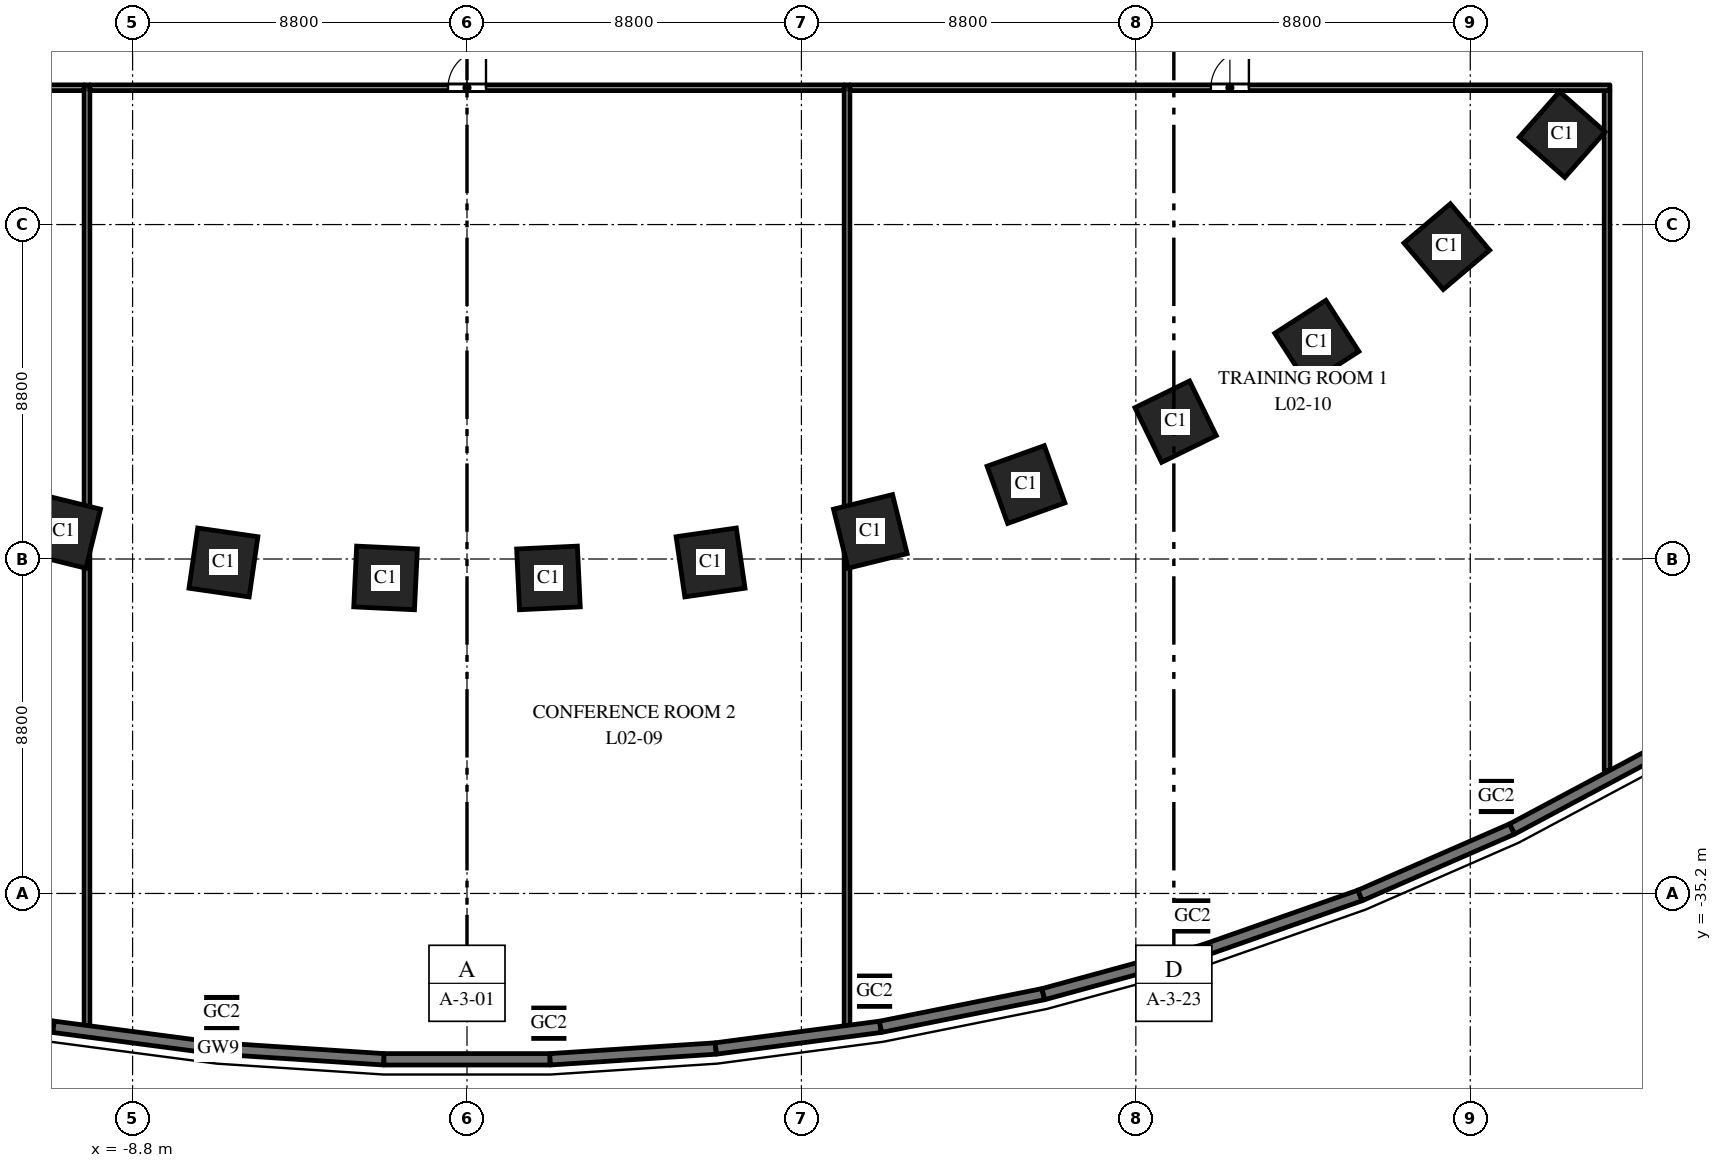
"""IFC4 building model, lengths in metres.
Left out: names, types, materials, properties, quantities, classifications, styles, units other than length and angle.
Written with IfcOpenShell. Run it as: python <this file> out.ifc"""

import sys

from ifc_helpers import new_model, si_unit, direction, frame, frame_2d, origin, origin_2d, place, context, subcontext, project, spatial, rectangle, hollow_rectangle, extrude, element, fill, save


model = new_model("IFC4")
c1 = context("Model", 3, precision=1e-05, world=origin(), true_north=direction((0.0, 1.0)))
c2 = subcontext(c1, "Body", "Model", "MODEL_VIEW")
j1 = project(units=[si_unit("LENGTHUNIT", "METRE"), si_unit("PLANEANGLEUNIT", "RADIAN")], contexts=[c1])
p1 = place(None, origin())
s1 = spatial("IfcSite", under=j1, at=p1, CompositionType="ELEMENT")
p2 = place(p1, origin())
s2 = spatial("IfcBuilding", under=s1, at=p2, CompositionType="ELEMENT")
p3 = place(p2, frame((0.0, 0.0, 13.5)))
s3 = spatial("IfcBuildingStorey", under=s2, at=p3, CompositionType="ELEMENT", Elevation=13.5)
for number, where, z_axis, x_axis in (
    (1, (-10.613, -25.674, 0.0), (0.0, 0.0, 1.0), (0.971, -0.24, 0.0)),
    (2, (-6.409, -26.491, 0.0), (0.0, 0.0, 1.0), (0.99, -0.143, 0.0)),
    (3, (-2.143, -26.898, 0.0), (0.0, 0.0, 1.0), (0.999, -0.048, 0.0)),
    (4, (2.143, -26.898, 0.0), (0.0, 0.0, 1.0), (0.999, 0.048, 0.0)),
    (5, (6.409, -26.491, 0.0), (0.0, 0.0, 1.0), (0.99, 0.143, 0.0)),
    (6, (10.613, -25.674, 0.0), (0.0, 0.0, 1.0), (0.971, 0.24, 0.0)),
    (7, (14.709, -24.441, 0.0), (0.0, 0.0, 1.0), (0.941, 0.338, 0.0)),
    (8, (18.646, -22.785, 0.0), (0.0, 0.0, 1.0), (0.898, 0.439, 0.0)),
    (9, (22.362, -20.7, 0.0), (0.0, 0.0, 1.0), (0.84, 0.542, 0.0)),
    (10, (25.783, -18.18, 0.0), (0.0, 0.0, 1.0), (0.763, 0.646, 0.0)),
    (11, (28.819, -15.23, 0.0), (0.0, 0.0, 1.0), (0.663, 0.749, 0.0)),
):
    element("IfcColumn", number, at=place(p3, frame(where, z_axis=z_axis, x_axis=x_axis)), inside=s3, PredefinedType="COLUMN", context=c2, shape_type="SweptSolid", body=[
        extrude(rectangle(XDim=1.6, YDim=1.6, at=origin_2d()), origin(), (0.0, 0.0, 1.0), 6.0),
    ])
for number, where, z_axis, x_axis in (
    (12, (-6.454, -38.333, 0.0), (0.0, 0.0, 1.0), (1.0, 0.0, 0.0)),
    (13, (2.155, -38.614, 0.0), (0.0, 0.0, 1.0), (1.0, 0.0, 0.0)),
    (14, (10.725, -37.771, 0.0), (0.0, 0.0, 1.0), (1.0, 0.0, 0.0)),
    (15, (19.097, -35.792, 0.0), (0.0, 0.0, 1.0), (1.0, 0.0, 0.0)),
    (16, (27.087, -32.648, 0.0), (0.0, 0.0, 1.0), (1.0, 0.0, 0.0)),
):
    element("IfcColumn", number, at=place(p3, frame(where, z_axis=z_axis, x_axis=x_axis)), inside=s3, PredefinedType="COLUMN", context=c2, shape_type="SweptSolid", body=[
        extrude(hollow_rectangle(XDim=0.8, YDim=0.8, WallThickness=0.04, at=origin_2d()), origin(), (0.0, 0.0, 1.0), 6.0),
    ])
p4 = place(p3, frame((-10.0, -13.925, 0.0), z_axis=(0.0, 0.0, 1.0), x_axis=(0.0, -1.0, 0.0)))
e17 = element("IfcWall", 17, at=p4, inside=s3, PredefinedType="PARTITIONING", context=c2, shape_type="SweptSolid", body=[
    extrude(rectangle(XDim=24.746, YDim=0.15, at=frame_2d((12.373, 0.0))), origin(), (0.0, 0.0, 1.0), 4.8),
])
p5 = place(p3, frame((-30.075, -14.0, 0.0), z_axis=(0.0, 0.0, 1.0), x_axis=(1.0, 0.0, 0.0)))
e18 = element("IfcWall", 18, at=p5, inside=s3, PredefinedType="PARTITIONING", context=c2, shape_type="SweptSolid", body=[
    extrude(rectangle(XDim=20.0, YDim=0.15, at=frame_2d((10.0, 0.0))), origin(), (0.0, 0.0, 1.0), 4.7),
])
p6 = place(p5, frame((9.5, 0.0, 0.0)))
e19 = element("IfcOpeningElement", 19, at=p6, cuts=e18, PredefinedType="OPENING", context=c2, shape_type="SweptSolid", body=[
    extrude(rectangle(XDim=1.0, YDim=2.1, at=frame_2d((0.5, 1.05))), frame((0.0, 0.085, 0.0), z_axis=(0.0, -1.0, 0.0), x_axis=(1.0, 0.0, 0.0)), (0.0, 0.0, 1.0), 0.17),
])
p7 = place(p3, frame((10.0, -13.925, 0.0), z_axis=(0.0, 0.0, 1.0), x_axis=(0.0, -1.0, 0.0)))
e20 = element("IfcWall", 20, at=p7, inside=s3, PredefinedType="PARTITIONING", context=c2, shape_type="SweptSolid", body=[
    extrude(rectangle(XDim=24.746, YDim=0.15, at=frame_2d((12.373, 0.0))), origin(), (0.0, 0.0, 1.0), 4.75),
])
p8 = place(p3, frame((-9.925, -14.0, 0.0), z_axis=(0.0, 0.0, 1.0), x_axis=(1.0, 0.0, 0.0)))
e21 = element("IfcWall", 21, at=p8, inside=s3, PredefinedType="PARTITIONING", context=c2, shape_type="SweptSolid", body=[
    extrude(rectangle(XDim=19.85, YDim=0.15, at=frame_2d((9.925, 0.0))), origin(), (0.0, 0.0, 1.0), 4.8),
])
p9 = place(p8, frame((9.425, 0.0, 0.0)))
e22 = element("IfcOpeningElement", 22, at=p9, cuts=e21, PredefinedType="OPENING", context=c2, shape_type="SweptSolid", body=[
    extrude(rectangle(XDim=1.0, YDim=2.1, at=frame_2d((0.5, 1.05))), frame((0.0, 0.085, 0.0), z_axis=(0.0, -1.0, 0.0), x_axis=(1.0, 0.0, 0.0)), (0.0, 0.0, 1.0), 0.17),
])
p10 = place(p3, frame((30.0, -14.075, 0.0), z_axis=(0.0, 0.0, 1.0), x_axis=(0.0, -1.0, 0.0)))
e23 = element("IfcWall", 23, at=p10, inside=s3, PredefinedType="PARTITIONING", context=c2, shape_type="SweptSolid", body=[
    extrude(rectangle(XDim=17.895, YDim=0.15, at=frame_2d((8.948, 0.0))), origin(), (0.0, 0.0, 1.0), 4.75),
])
p11 = place(p3, frame((10.075, -14.0, 0.0), z_axis=(0.0, 0.0, 1.0), x_axis=(1.0, 0.0, 0.0)))
e24 = element("IfcWall", 24, at=p11, inside=s3, PredefinedType="PARTITIONING", context=c2, shape_type="SweptSolid", body=[
    extrude(rectangle(XDim=20.0, YDim=0.15, at=frame_2d((10.0, 0.0))), origin(), (0.0, 0.0, 1.0), 4.7),
])
p12 = place(p11, frame((9.5, 0.0, 0.0)))
e25 = element("IfcOpeningElement", 25, at=p12, cuts=e24, PredefinedType="OPENING", context=c2, shape_type="SweptSolid", body=[
    extrude(rectangle(XDim=1.0, YDim=2.1, at=frame_2d((0.5, 1.05))), frame((0.0, 0.085, 0.0), z_axis=(0.0, -1.0, 0.0), x_axis=(1.0, 0.0, 0.0)), (0.0, 0.0, 1.0), 0.17),
])
p13 = place(p3, frame((-15.165, -37.85, 0.0), z_axis=(0.0, 0.0, 1.0), x_axis=(0.980494629762, -0.196545875071, 0.0)))
e26 = element("IfcWall", 26, at=p13, inside=s3, PredefinedType="SOLIDWALL", context=c2, shape_type="SweptSolid", body=[
    extrude(rectangle(XDim=4.37, YDim=0.3, at=frame_2d((2.185, 0.0))), origin(), (0.0, 0.0, 1.0), 5.75),
])
p14 = place(p13, frame((0.985, 0.0, 1.0)))
e27 = element("IfcOpeningElement", 27, at=p14, cuts=e26, PredefinedType="OPENING", context=c2, shape_type="SweptSolid", body=[
    extrude(rectangle(XDim=2.4, YDim=3.0, at=frame_2d((1.2, 1.5))), frame((0.0, 0.16, 0.0), z_axis=(0.0, -1.0, 0.0), x_axis=(1.0, 0.0, 0.0)), (0.0, 0.0, 1.0), 0.32),
])
p15 = place(p3, frame((-10.88, -38.709, 0.0), z_axis=(0.0, 0.0, 1.0), x_axis=(0.991441741932, -0.130549884544, 0.0)))
e28 = element("IfcWall", 28, at=p15, inside=s3, PredefinedType="SOLIDWALL", context=c2, shape_type="SweptSolid", body=[
    extrude(rectangle(XDim=4.37, YDim=0.3, at=frame_2d((2.185, 0.0))), origin(), (0.0, 0.0, 1.0), 5.75),
])
p16 = place(p15, frame((1.045, 0.0, 1.0)))
e29 = element("IfcOpeningElement", 29, at=p16, cuts=e28, PredefinedType="OPENING", context=c2, shape_type="SweptSolid", body=[
    extrude(rectangle(XDim=2.4, YDim=3.0, at=frame_2d((1.2, 1.5))), frame((0.0, 0.16, 0.0), z_axis=(0.0, -1.0, 0.0), x_axis=(1.0, 0.0, 0.0)), (0.0, 0.0, 1.0), 0.32),
])
p17 = place(p3, frame((-6.547, -39.28, 0.0), z_axis=(0.0, 0.0, 1.0), x_axis=(0.997876871627, -0.065128711577, 0.0)))
e30 = element("IfcWall", 30, at=p17, inside=s3, PredefinedType="SOLIDWALL", context=c2, shape_type="SweptSolid", body=[
    extrude(rectangle(XDim=4.371, YDim=0.3, at=frame_2d((2.186, 0.0))), origin(), (0.0, 0.0, 1.0), 5.75),
])
p18 = place(p17, frame((0.985, 0.0, 1.0)))
e31 = element("IfcOpeningElement", 31, at=p18, cuts=e30, PredefinedType="OPENING", context=c2, shape_type="SweptSolid", body=[
    extrude(rectangle(XDim=2.4, YDim=3.0, at=frame_2d((1.2, 1.5))), frame((0.0, 0.16, 0.0), z_axis=(0.0, -1.0, 0.0), x_axis=(1.0, 0.0, 0.0)), (0.0, 0.0, 1.0), 0.32),
])
p19 = place(p3, frame((-2.186, -39.564, 0.0), z_axis=(0.0, 0.0, 1.0), x_axis=(1.0, 0.0, 0.0)))
e32 = element("IfcWall", 32, at=p19, inside=s3, PredefinedType="SOLIDWALL", context=c2, shape_type="SweptSolid", body=[
    extrude(rectangle(XDim=4.371, YDim=0.3, at=frame_2d((2.186, 0.0))), origin(), (0.0, 0.0, 1.0), 5.75),
])
p20 = place(p19, frame((0.986, 0.0, 1.0)))
e33 = element("IfcOpeningElement", 33, at=p20, cuts=e32, PredefinedType="OPENING", context=c2, shape_type="SweptSolid", body=[
    extrude(rectangle(XDim=2.4, YDim=3.0, at=frame_2d((1.2, 1.5))), frame((0.0, 0.16, 0.0), z_axis=(0.0, -1.0, 0.0), x_axis=(1.0, 0.0, 0.0)), (0.0, 0.0, 1.0), 0.32),
])
p21 = place(p3, frame((2.186, -39.564, 0.0), z_axis=(0.0, 0.0, 1.0), x_axis=(0.997876871627, 0.065128711577, 0.0)))
e34 = element("IfcWall", 34, at=p21, inside=s3, PredefinedType="SOLIDWALL", context=c2, shape_type="SweptSolid", body=[
    extrude(rectangle(XDim=4.371, YDim=0.3, at=frame_2d((2.186, 0.0))), origin(), (0.0, 0.0, 1.0), 5.75),
])
p22 = place(p21, frame((0.985, 0.0, 1.0)))
e35 = element("IfcOpeningElement", 35, at=p22, cuts=e34, PredefinedType="OPENING", context=c2, shape_type="SweptSolid", body=[
    extrude(rectangle(XDim=2.4, YDim=3.0, at=frame_2d((1.2, 1.5))), frame((0.0, 0.16, 0.0), z_axis=(0.0, -1.0, 0.0), x_axis=(1.0, 0.0, 0.0)), (0.0, 0.0, 1.0), 0.32),
])
p23 = place(p3, frame((6.547, -39.28, 0.0), z_axis=(0.0, 0.0, 1.0), x_axis=(0.991441741932, 0.130549884544, 0.0)))
e36 = element("IfcWall", 36, at=p23, inside=s3, PredefinedType="SOLIDWALL", context=c2, shape_type="SweptSolid", body=[
    extrude(rectangle(XDim=4.37, YDim=0.3, at=frame_2d((2.185, 0.0))), origin(), (0.0, 0.0, 1.0), 5.75),
])
p24 = place(p23, frame((0.925, 0.0, 1.0)))
e37 = element("IfcOpeningElement", 37, at=p24, cuts=e36, PredefinedType="OPENING", context=c2, shape_type="SweptSolid", body=[
    extrude(rectangle(XDim=2.4, YDim=3.0, at=frame_2d((1.2, 1.5))), frame((0.0, 0.16, 0.0), z_axis=(0.0, -1.0, 0.0), x_axis=(1.0, 0.0, 0.0)), (0.0, 0.0, 1.0), 0.32),
])
p25 = place(p3, frame((10.88, -38.709, 0.0), z_axis=(0.0, 0.0, 1.0), x_axis=(0.980494629762, 0.196545875071, 0.0)))
e38 = element("IfcWall", 38, at=p25, inside=s3, PredefinedType="SOLIDWALL", context=c2, shape_type="SweptSolid", body=[
    extrude(rectangle(XDim=4.37, YDim=0.3, at=frame_2d((2.185, 0.0))), origin(), (0.0, 0.0, 1.0), 5.75),
])
p26 = place(p25, frame((0.985, 0.0, 1.0)))
e39 = element("IfcOpeningElement", 39, at=p26, cuts=e38, PredefinedType="OPENING", context=c2, shape_type="SweptSolid", body=[
    extrude(rectangle(XDim=2.4, YDim=3.0, at=frame_2d((1.2, 1.5))), frame((0.0, 0.16, 0.0), z_axis=(0.0, -1.0, 0.0), x_axis=(1.0, 0.0, 0.0)), (0.0, 0.0, 1.0), 0.32),
])
p27 = place(p3, frame((15.165, -37.85, 0.0), z_axis=(0.0, 0.0, 1.0), x_axis=(0.964679950239, 0.263424739931, 0.0)))
e40 = element("IfcWall", 40, at=p27, inside=s3, PredefinedType="SOLIDWALL", context=c2, shape_type="SweptSolid", body=[
    extrude(rectangle(XDim=4.369, YDim=0.3, at=frame_2d((2.185, 0.0))), origin(), (0.0, 0.0, 1.0), 5.75),
])
p28 = place(p27, frame((0.985, 0.0, 1.0)))
e41 = element("IfcOpeningElement", 41, at=p28, cuts=e40, PredefinedType="OPENING", context=c2, shape_type="SweptSolid", body=[
    extrude(rectangle(XDim=2.4, YDim=3.0, at=frame_2d((1.2, 1.5))), frame((0.0, 0.16, 0.0), z_axis=(0.0, -1.0, 0.0), x_axis=(1.0, 0.0, 0.0)), (0.0, 0.0, 1.0), 0.32),
])
p29 = place(p3, frame((19.379, -36.699, 0.0), z_axis=(0.0, 0.0, 1.0), x_axis=(0.943526738033, 0.331296384853, 0.0)))
e42 = element("IfcWall", 42, at=p29, inside=s3, PredefinedType="SOLIDWALL", context=c2, shape_type="SweptSolid", body=[
    extrude(rectangle(XDim=4.368, YDim=0.3, at=frame_2d((2.184, 0.0))), origin(), (0.0, 0.0, 1.0), 5.75),
])
p30 = place(p29, frame((0.984, 0.0, 1.0)))
e43 = element("IfcOpeningElement", 43, at=p30, cuts=e42, PredefinedType="OPENING", context=c2, shape_type="SweptSolid", body=[
    extrude(rectangle(XDim=2.4, YDim=3.0, at=frame_2d((1.2, 1.5))), frame((0.0, 0.16, 0.0), z_axis=(0.0, -1.0, 0.0), x_axis=(1.0, 0.0, 0.0)), (0.0, 0.0, 1.0), 0.32),
])
p31 = place(p3, frame((23.5, -35.252, 0.0), z_axis=(0.0, 0.0, 1.0), x_axis=(0.916336904548, 0.400408138483, 0.0)))
e44 = element("IfcWall", 44, at=p31, inside=s3, PredefinedType="SOLIDWALL", context=c2, shape_type="SweptSolid", body=[
    extrude(rectangle(XDim=4.366, YDim=0.3, at=frame_2d((2.183, 0.0))), origin(), (0.0, 0.0, 1.0), 5.75),
])
p32 = place(p31, frame((0.983, 0.0, 1.0)))
e45 = element("IfcOpeningElement", 45, at=p32, cuts=e44, PredefinedType="OPENING", context=c2, shape_type="SweptSolid", body=[
    extrude(rectangle(XDim=2.4, YDim=3.0, at=frame_2d((1.2, 1.5))), frame((0.0, 0.16, 0.0), z_axis=(0.0, -1.0, 0.0), x_axis=(1.0, 0.0, 0.0)), (0.0, 0.0, 1.0), 0.32),
])
p33 = place(p3, frame((27.501, -33.504, 0.0), z_axis=(0.0, 0.0, 1.0), x_axis=(0.882159305704, 0.47095112205, 0.0)))
e46 = element("IfcWall", 46, at=p33, inside=s3, PredefinedType="SOLIDWALL", context=c2, shape_type="SweptSolid", body=[
    extrude(rectangle(XDim=4.365, YDim=0.3, at=frame_2d((2.182, 0.0))), origin(), (0.0, 0.0, 1.0), 5.75),
])
p34 = place(p33, frame((0.342, 0.0, 1.0)))
e47 = element("IfcOpeningElement", 47, at=p34, cuts=e46, PredefinedType="OPENING", context=c2, shape_type="SweptSolid", body=[
    extrude(rectangle(XDim=2.4, YDim=3.0, at=frame_2d((1.2, 1.5))), frame((0.0, 0.16, 0.0), z_axis=(0.0, -1.0, 0.0), x_axis=(1.0, 0.0, 0.0)), (0.0, 0.0, 1.0), 0.32),
])
p35 = place(p9, origin())
e48 = element("IfcDoor", 48, at=p35, inside=s3, OperationType="SINGLE_SWING_RIGHT", PredefinedType="DOOR", context=c2, shape_type="SweptSolid", body=[
    extrude(rectangle(XDim=1.0, YDim=2.1, at=frame_2d((0.5, 1.05))), frame((0.0, 0.025, 0.0), z_axis=(0.0, -1.0, 0.0), x_axis=(1.0, 0.0, 0.0)), (0.0, 0.0, 1.0), 0.05),
])
fill(e22, e48)
p36 = place(p12, origin())
e49 = element("IfcDoor", 49, at=p36, inside=s3, OperationType="SINGLE_SWING_RIGHT", PredefinedType="DOOR", context=c2, shape_type="SweptSolid", body=[
    extrude(rectangle(XDim=1.0, YDim=2.1, at=frame_2d((0.5, 1.05))), frame((0.0, 0.025, 0.0), z_axis=(0.0, -1.0, 0.0), x_axis=(1.0, 0.0, 0.0)), (0.0, 0.0, 1.0), 0.05),
])
fill(e25, e49)
p37 = place(p16, origin())
e50 = element("IfcWindow", 50, at=p37, inside=s3, PartitioningType="SINGLE_PANEL", PredefinedType="WINDOW", context=c2, shape_type="SweptSolid", body=[
    extrude(rectangle(XDim=2.4, YDim=3.0, at=frame_2d((1.2, 1.5))), frame((0.0, 0.03, 0.0), z_axis=(0.0, -1.0, 0.0), x_axis=(1.0, 0.0, 0.0)), (0.0, 0.0, 1.0), 0.06),
])
fill(e29, e50)
p38 = place(p18, origin())
e51 = element("IfcWindow", 51, at=p38, inside=s3, PartitioningType="SINGLE_PANEL", PredefinedType="WINDOW", context=c2, shape_type="SweptSolid", body=[
    extrude(rectangle(XDim=2.4, YDim=3.0, at=frame_2d((1.2, 1.5))), frame((0.0, 0.03, 0.0), z_axis=(0.0, -1.0, 0.0), x_axis=(1.0, 0.0, 0.0)), (0.0, 0.0, 1.0), 0.06),
])
fill(e31, e51)
p39 = place(p20, origin())
e52 = element("IfcWindow", 52, at=p39, inside=s3, PartitioningType="SINGLE_PANEL", PredefinedType="WINDOW", context=c2, shape_type="SweptSolid", body=[
    extrude(rectangle(XDim=2.4, YDim=3.0, at=frame_2d((1.2, 1.5))), frame((0.0, 0.03, 0.0), z_axis=(0.0, -1.0, 0.0), x_axis=(1.0, 0.0, 0.0)), (0.0, 0.0, 1.0), 0.06),
])
fill(e33, e52)
p40 = place(p22, origin())
e53 = element("IfcWindow", 53, at=p40, inside=s3, PartitioningType="SINGLE_PANEL", PredefinedType="WINDOW", context=c2, shape_type="SweptSolid", body=[
    extrude(rectangle(XDim=2.4, YDim=3.0, at=frame_2d((1.2, 1.5))), frame((0.0, 0.03, 0.0), z_axis=(0.0, -1.0, 0.0), x_axis=(1.0, 0.0, 0.0)), (0.0, 0.0, 1.0), 0.06),
])
fill(e35, e53)
p41 = place(p24, origin())
e54 = element("IfcWindow", 54, at=p41, inside=s3, PartitioningType="SINGLE_PANEL", PredefinedType="WINDOW", context=c2, shape_type="SweptSolid", body=[
    extrude(rectangle(XDim=2.4, YDim=3.0, at=frame_2d((1.2, 1.5))), frame((0.0, 0.03, 0.0), z_axis=(0.0, -1.0, 0.0), x_axis=(1.0, 0.0, 0.0)), (0.0, 0.0, 1.0), 0.06),
])
fill(e37, e54)
p42 = place(p26, origin())
e55 = element("IfcWindow", 55, at=p42, inside=s3, PartitioningType="SINGLE_PANEL", PredefinedType="WINDOW", context=c2, shape_type="SweptSolid", body=[
    extrude(rectangle(XDim=2.4, YDim=3.0, at=frame_2d((1.2, 1.5))), frame((0.0, 0.03, 0.0), z_axis=(0.0, -1.0, 0.0), x_axis=(1.0, 0.0, 0.0)), (0.0, 0.0, 1.0), 0.06),
])
fill(e39, e55)
p43 = place(p28, origin())
e56 = element("IfcWindow", 56, at=p43, inside=s3, PartitioningType="SINGLE_PANEL", PredefinedType="WINDOW", context=c2, shape_type="SweptSolid", body=[
    extrude(rectangle(XDim=2.4, YDim=3.0, at=frame_2d((1.2, 1.5))), frame((0.0, 0.03, 0.0), z_axis=(0.0, -1.0, 0.0), x_axis=(1.0, 0.0, 0.0)), (0.0, 0.0, 1.0), 0.06),
])
fill(e41, e56)
p44 = place(p30, origin())
e57 = element("IfcWindow", 57, at=p44, inside=s3, PartitioningType="SINGLE_PANEL", PredefinedType="WINDOW", context=c2, shape_type="SweptSolid", body=[
    extrude(rectangle(XDim=2.4, YDim=3.0, at=frame_2d((1.2, 1.5))), frame((0.0, 0.03, 0.0), z_axis=(0.0, -1.0, 0.0), x_axis=(1.0, 0.0, 0.0)), (0.0, 0.0, 1.0), 0.06),
])
fill(e43, e57)
p45 = place(p32, origin())
e58 = element("IfcWindow", 58, at=p45, inside=s3, PartitioningType="SINGLE_PANEL", PredefinedType="WINDOW", context=c2, shape_type="SweptSolid", body=[
    extrude(rectangle(XDim=2.4, YDim=3.0, at=frame_2d((1.2, 1.5))), frame((0.0, 0.03, 0.0), z_axis=(0.0, -1.0, 0.0), x_axis=(1.0, 0.0, 0.0)), (0.0, 0.0, 1.0), 0.06),
])
fill(e45, e58)
p46 = place(p34, origin())
e59 = element("IfcWindow", 59, at=p46, inside=s3, PartitioningType="SINGLE_PANEL", PredefinedType="WINDOW", context=c2, shape_type="SweptSolid", body=[
    extrude(rectangle(XDim=2.4, YDim=3.0, at=frame_2d((1.2, 1.5))), frame((0.0, 0.03, 0.0), z_axis=(0.0, -1.0, 0.0), x_axis=(1.0, 0.0, 0.0)), (0.0, 0.0, 1.0), 0.06),
])
fill(e47, e59)
save(model, sys.argv[1])
